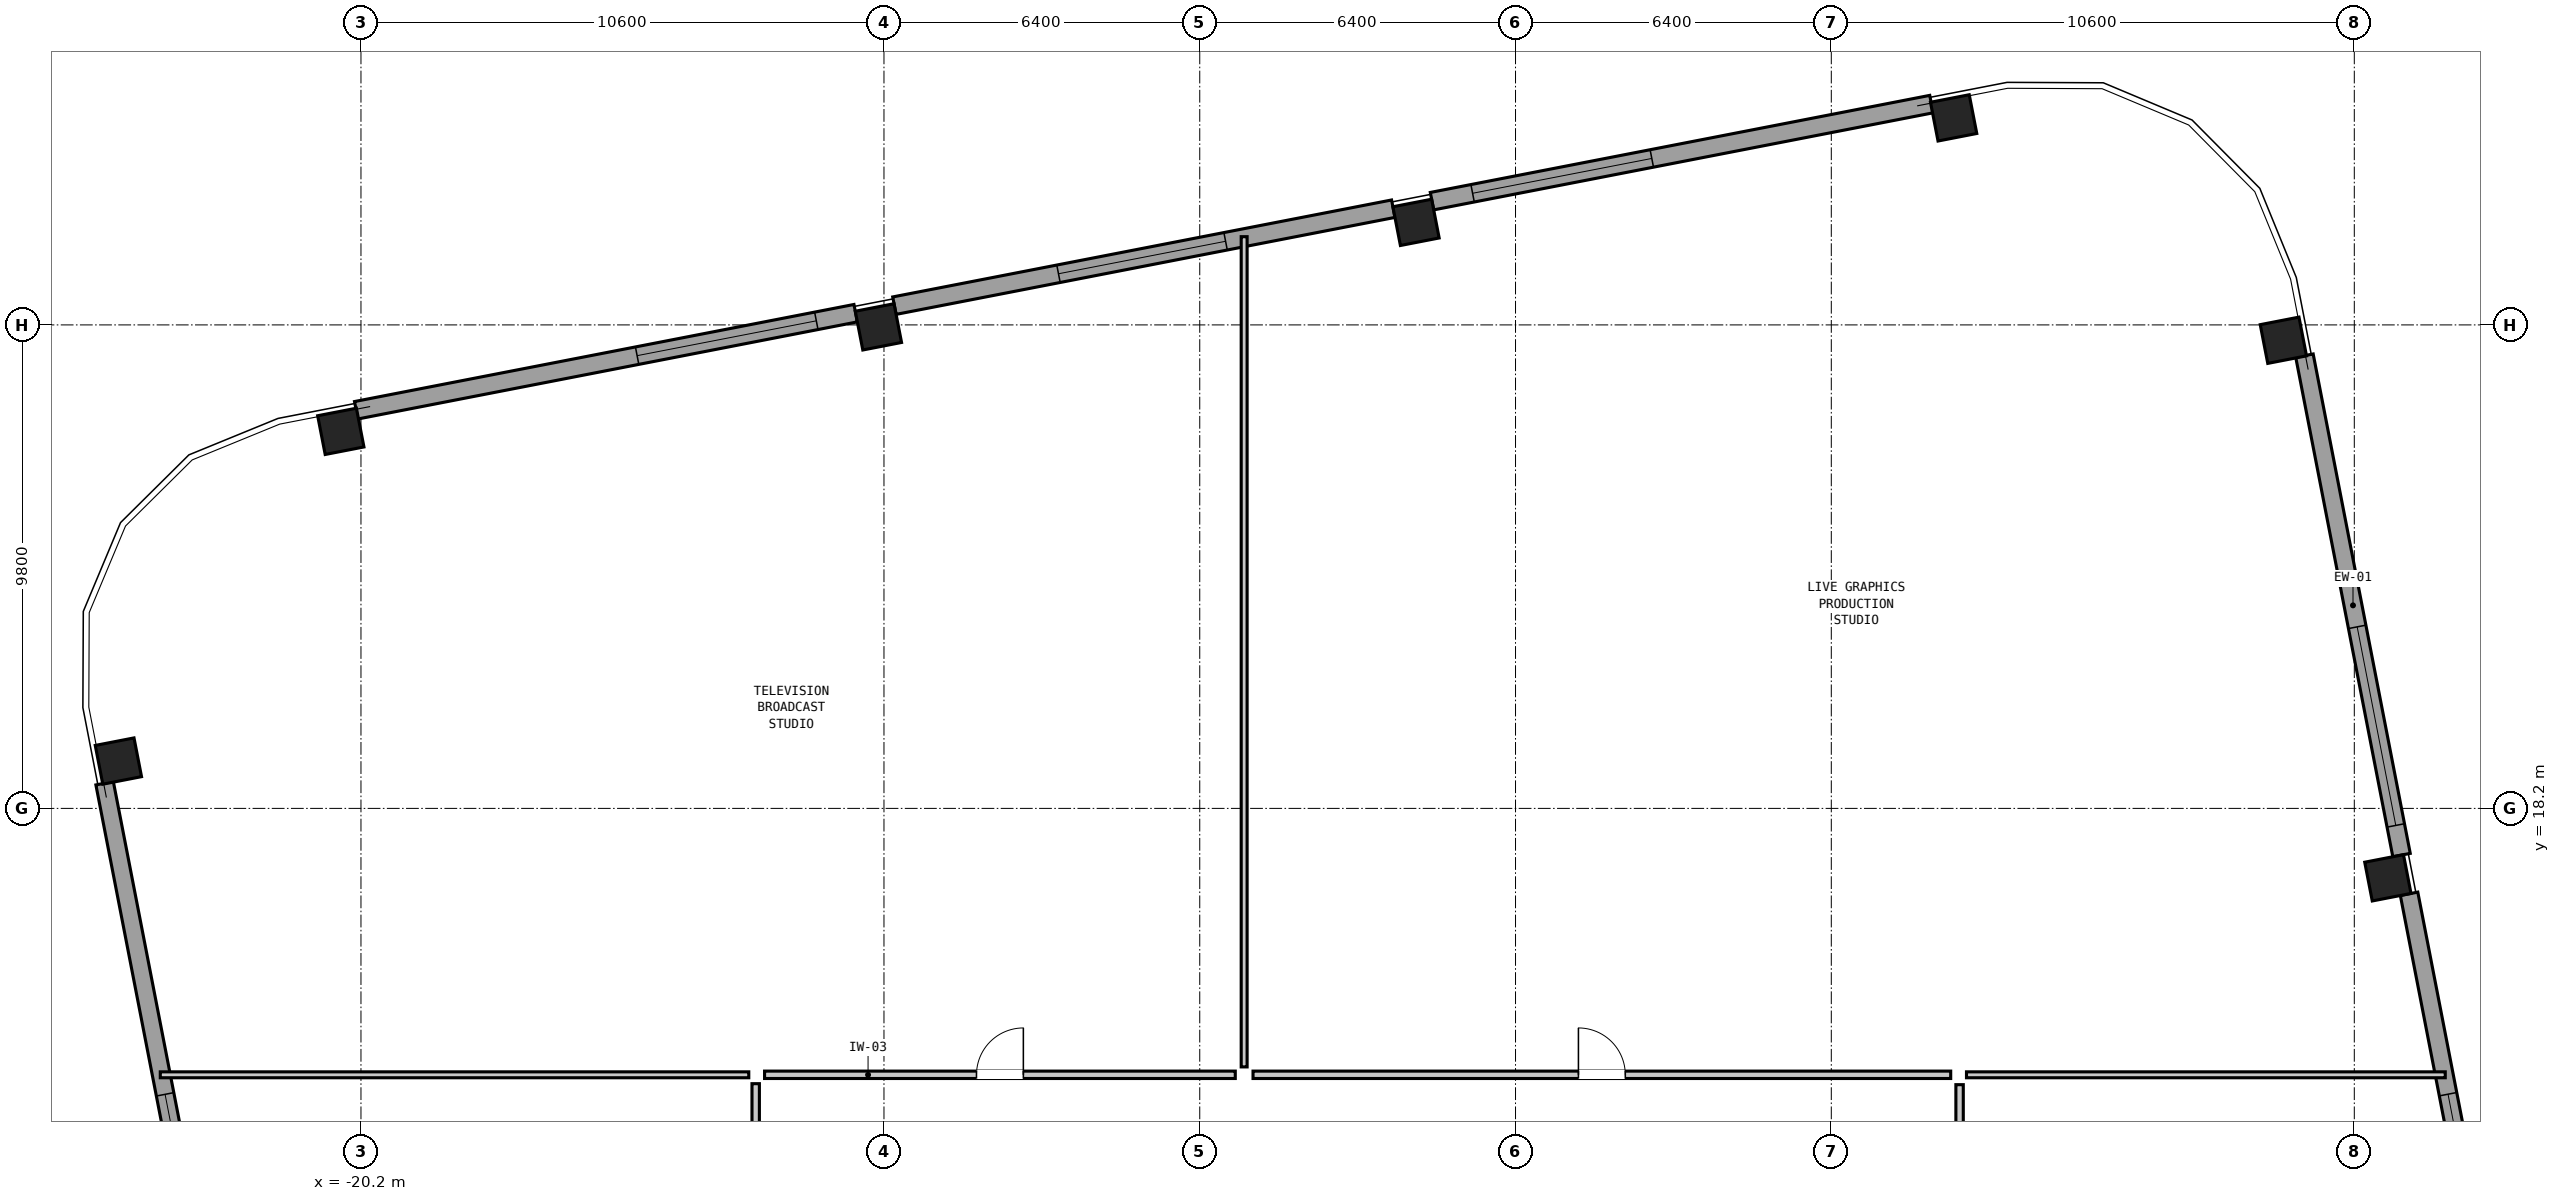
"""IFC4 building model, lengths in metres.
Left out: names, types, materials, properties, quantities, classifications, styles, units other than length and angle.
Written with IfcOpenShell. Run it as: python <this file> out.ifc"""

import sys

from ifc_helpers import new_model, si_unit, direction, frame, frame_2d, origin, origin_2d, place, context, subcontext, project, spatial, rectangle, hollow_rectangle, extrude, element, fill, save


model = new_model("IFC4")
c1 = context("Model", 3, precision=1e-05, world=origin(), true_north=direction((0.0, 1.0)))
c2 = subcontext(c1, "Body", "Model", "MODEL_VIEW")
j1 = project(units=[si_unit("LENGTHUNIT", "METRE"), si_unit("PLANEANGLEUNIT", "RADIAN")], contexts=[c1])
p1 = place(None, origin())
s1 = spatial("IfcSite", under=j1, at=p1, CompositionType="ELEMENT")
p2 = place(p1, origin())
s2 = spatial("IfcBuilding", under=s1, at=p2, CompositionType="ELEMENT")
p3 = place(p2, frame((0.0, 0.0, 112.8)))
s3 = spatial("IfcBuildingStorey", under=s2, at=p3, CompositionType="ELEMENT", Elevation=112.8)
for number, where, z_axis, x_axis in (
    (1, (20.88, 16.792, 0.0), (0.0, 0.0, 1.0), (-0.191, 0.982, 0.0)),
    (2, (18.762, 27.689, 0.0), (0.0, 0.0, 1.0), (-0.191, 0.982, 0.0)),
    (3, (12.08, 32.196, 0.0), (0.0, 0.0, 1.0), (0.982, 0.191, 0.0)),
    (4, (1.183, 30.078, 0.0), (0.0, 0.0, 1.0), (0.982, 0.191, 0.0)),
    (5, (-9.713, 27.96, 0.0), (0.0, 0.0, 1.0), (0.982, 0.191, 0.0)),
    (6, (-20.609, 25.842, 0.0), (0.0, 0.0, 1.0), (0.982, 0.191, 0.0)),
    (7, (-25.116, 19.159, 0.0), (0.0, 0.0, 1.0), (-0.191, 0.982, 0.0)),
):
    element("IfcColumn", number, at=place(p3, frame(where, z_axis=z_axis, x_axis=x_axis)), inside=s3, PredefinedType="COLUMN", context=c2, shape_type="SweptSolid", body=[
        extrude(hollow_rectangle(XDim=0.8, YDim=0.8, WallThickness=0.05, at=origin_2d()), origin(), (0.0, 0.0, 1.0), 3.05),
    ])
p4 = place(p3, frame((19.19, 27.376, 0.0), z_axis=(0.0, 0.0, 1.0), x_axis=(0.190822765986, -0.981624506612, 0.0)))
e8 = element("IfcWall", 8, at=p4, inside=s3, PredefinedType="SOLIDWALL", context=c2, shape_type="SweptSolid", body=[
    extrude(rectangle(XDim=10.312, YDim=0.36, at=frame_2d((5.156, 0.0))), origin(), (0.0, 0.0, 1.0), 1.632),
])
p5 = place(p4, frame((5.6, 0.0, 0.2)))
e9 = element("IfcOpeningElement", 9, at=p5, cuts=e8, PredefinedType="OPENING", context=c2, shape_type="SweptSolid", body=[
    extrude(rectangle(XDim=4.1, YDim=1.05, at=frame_2d((2.05, 0.525))), frame((0.0, 0.192, 0.0), z_axis=(0.0, -1.0, 0.0), x_axis=(1.0, 0.0, 0.0)), (0.0, 0.0, 1.0), 0.384),
])
p6 = place(p3, frame((21.31, 16.469, 0.0), z_axis=(0.0, 0.0, 1.0), x_axis=(0.190811924826, -0.981626614016, 0.0)))
e10 = element("IfcWall", 10, at=p6, inside=s3, PredefinedType="SOLIDWALL", context=c2, shape_type="SweptSolid", body=[
    extrude(rectangle(XDim=10.3, YDim=0.36, at=frame_2d((5.15, 0.0))), origin(), (0.0, 0.0, 1.0), 1.632),
])
p7 = place(p6, frame((4.138, 0.0, 0.2)))
e11 = element("IfcOpeningElement", 11, at=p7, cuts=e10, PredefinedType="OPENING", context=c2, shape_type="SweptSolid", body=[
    extrude(rectangle(XDim=2.7, YDim=1.25, at=frame_2d((1.35, 0.625))), frame((0.0, 0.192, 0.0), z_axis=(0.0, -1.0, 0.0), x_axis=(1.0, 0.0, 0.0)), (0.0, 0.0, 1.0), 0.384),
])
p8 = place(p3, frame((-20.296, 26.27, 0.0), z_axis=(0.0, 0.0, 1.0), x_axis=(0.981628941133, 0.190799952646, 0.0)))
e12 = element("IfcWall", 12, at=p8, inside=s3, PredefinedType="SOLIDWALL", context=c2, shape_type="SweptSolid", body=[
    extrude(rectangle(XDim=10.312, YDim=0.36, at=frame_2d((5.156, 0.0))), origin(), (0.0, 0.0, 1.0), 1.632),
])
p9 = place(p8, frame((5.8, 0.0, 0.2)))
e13 = element("IfcOpeningElement", 13, at=p9, cuts=e12, PredefinedType="OPENING", context=c2, shape_type="SweptSolid", body=[
    extrude(rectangle(XDim=3.7, YDim=1.1, at=frame_2d((1.85, 0.55))), frame((0.0, 0.192, 0.0), z_axis=(0.0, -1.0, 0.0), x_axis=(1.0, 0.0, 0.0)), (0.0, 0.0, 1.0), 0.384),
])
p10 = place(p3, frame((-9.389, 28.39, 0.0), z_axis=(0.0, 0.0, 1.0), x_axis=(0.981627477005, 0.190807485147, 0.0)))
e14 = element("IfcWall", 14, at=p10, inside=s3, PredefinedType="SOLIDWALL", context=c2, shape_type="SweptSolid", body=[
    extrude(rectangle(XDim=10.3, YDim=0.36, at=frame_2d((5.15, 0.0))), origin(), (0.0, 0.0, 1.0), 1.632),
])
p11 = place(p10, frame((3.388, 0.0, 0.2)))
e15 = element("IfcOpeningElement", 15, at=p11, cuts=e14, PredefinedType="OPENING", context=c2, shape_type="SweptSolid", body=[
    extrude(rectangle(XDim=3.45, YDim=1.15, at=frame_2d((1.725, 0.575))), frame((0.0, 0.192, 0.0), z_axis=(0.0, -1.0, 0.0), x_axis=(1.0, 0.0, 0.0)), (0.0, 0.0, 1.0), 0.384),
])
p12 = place(p3, frame((1.507, 30.508, 0.0), z_axis=(0.0, 0.0, 1.0), x_axis=(0.981628941133, 0.190799952646, 0.0)))
e16 = element("IfcWall", 16, at=p12, inside=s3, PredefinedType="SOLIDWALL", context=c2, shape_type="SweptSolid", body=[
    extrude(rectangle(XDim=10.312, YDim=0.36, at=frame_2d((5.156, 0.0))), origin(), (0.0, 0.0, 1.0), 1.632),
])
p13 = place(p12, frame((0.838, 0.0, 0.2)))
e17 = element("IfcOpeningElement", 17, at=p13, cuts=e16, PredefinedType="OPENING", context=c2, shape_type="SweptSolid", body=[
    extrude(rectangle(XDim=3.7, YDim=1.1, at=frame_2d((1.85, 0.55))), frame((0.0, 0.192, 0.0), z_axis=(0.0, -1.0, 0.0), x_axis=(1.0, 0.0, 0.0)), (0.0, 0.0, 1.0), 0.384),
])
p14 = place(p3, frame((-23.428, 8.587, 0.0), z_axis=(0.0, 0.0, 1.0), x_axis=(-0.190822765986, 0.981624506612, 0.0)))
e18 = element("IfcWall", 18, at=p14, inside=s3, PredefinedType="SOLIDWALL", context=c2, shape_type="SweptSolid", body=[
    extrude(rectangle(XDim=10.312, YDim=0.36, at=frame_2d((5.156, 0.0))), origin(), (0.0, 0.0, 1.0), 1.632),
])
p15 = place(p14, frame((0.988, 0.0, 0.2)))
e19 = element("IfcOpeningElement", 19, at=p15, cuts=e18, PredefinedType="OPENING", context=c2, shape_type="SweptSolid", body=[
    extrude(rectangle(XDim=2.9, YDim=1.25, at=frame_2d((1.45, 0.625))), frame((0.0, 0.192, 0.0), z_axis=(0.0, -1.0, 0.0), x_axis=(1.0, 0.0, 0.0)), (0.0, 0.0, 1.0), 0.384),
])
p16 = place(p3, frame((-24.267, 12.8, 0.0), z_axis=(0.0, 0.0, 1.0), x_axis=(1.0, 0.0, 0.0)))
e20 = element("IfcWall", 20, at=p16, inside=s3, PredefinedType="PARTITIONING", context=c2, shape_type="SweptSolid", body=[
    extrude(rectangle(XDim=11.927, YDim=0.12, at=frame_2d((5.964, 0.0))), origin(), (0.0, 0.0, 1.0), 2.83),
])
p17 = place(p3, frame((12.34, 12.8, 0.0), z_axis=(0.0, 0.0, 1.0), x_axis=(1.0, 0.0, 0.0)))
e21 = element("IfcWall", 21, at=p17, inside=s3, PredefinedType="PARTITIONING", context=c2, shape_type="SweptSolid", body=[
    extrude(rectangle(XDim=9.703, YDim=0.12, at=frame_2d((4.852, 0.0))), origin(), (0.0, 0.0, 1.0), 2.83),
])
p18 = place(p3, frame((-2.3, 12.96, 0.0), z_axis=(0.0, 0.0, 1.0), x_axis=(0.0, 1.0, 0.0)))
e22 = element("IfcWall", 22, at=p18, inside=s3, PredefinedType="PARTITIONING", context=c2, shape_type="SweptSolid", body=[
    extrude(rectangle(XDim=16.828, YDim=0.12, at=frame_2d((8.414, 0.0))), origin(), (0.0, 0.0, 1.0), 2.83),
])
p19 = place(p3, frame((-12.02, 12.8, 0.0), z_axis=(0.0, 0.0, 1.0), x_axis=(1.0, 0.0, 0.0)))
e23 = element("IfcWall", 23, at=p19, inside=s3, PredefinedType="PARTITIONING", context=c2, shape_type="SweptSolid", body=[
    extrude(rectangle(XDim=9.54, YDim=0.15, at=frame_2d((4.77, 0.0))), origin(), (0.0, 0.0, 1.0), 2.83),
])
p20 = place(p19, frame((4.295, 0.0, 0.0)))
e24 = element("IfcOpeningElement", 24, at=p20, cuts=e23, PredefinedType="OPENING", context=c2, shape_type="SweptSolid", body=[
    extrude(rectangle(XDim=0.95, YDim=2.1, at=frame_2d((0.475, 1.05))), frame((0.0, 0.087, 0.0), z_axis=(0.0, -1.0, 0.0), x_axis=(1.0, 0.0, 0.0)), (0.0, 0.0, 1.0), 0.174),
])
p21 = place(p3, frame((-2.12, 12.8, 0.0), z_axis=(0.0, 0.0, 1.0), x_axis=(1.0, 0.0, 0.0)))
e25 = element("IfcWall", 25, at=p21, inside=s3, PredefinedType="PARTITIONING", context=c2, shape_type="SweptSolid", body=[
    extrude(rectangle(XDim=14.14, YDim=0.15, at=frame_2d((7.07, 0.0))), origin(), (0.0, 0.0, 1.0), 2.83),
])
p22 = place(p21, frame((6.595, 0.0, 0.0)))
e26 = element("IfcOpeningElement", 26, at=p22, cuts=e25, PredefinedType="OPENING", context=c2, shape_type="SweptSolid", body=[
    extrude(rectangle(XDim=0.95, YDim=2.1, at=frame_2d((0.475, 1.05))), frame((0.0, 0.087, 0.0), z_axis=(0.0, -1.0, 0.0), x_axis=(1.0, 0.0, 0.0)), (0.0, 0.0, 1.0), 0.174),
])
p23 = place(p3, frame((-12.2, -11.42, 0.0), z_axis=(0.0, 0.0, 1.0), x_axis=(0.0, 1.0, 0.0)))
e27 = element("IfcWall", 27, at=p23, inside=s3, PredefinedType="PARTITIONING", context=c2, shape_type="SweptSolid", body=[
    extrude(rectangle(XDim=24.04, YDim=0.15, at=frame_2d((12.02, 0.0))), origin(), (0.0, 0.0, 1.0), 2.83),
])
p24 = place(p23, frame((11.545, 0.0, 0.0)))
e28 = element("IfcOpeningElement", 28, at=p24, cuts=e27, PredefinedType="OPENING", context=c2, shape_type="SweptSolid", body=[
    extrude(rectangle(XDim=0.95, YDim=2.1, at=frame_2d((0.475, 1.05))), frame((0.0, 0.087, 0.0), z_axis=(0.0, -1.0, 0.0), x_axis=(1.0, 0.0, 0.0)), (0.0, 0.0, 1.0), 0.174),
])
p25 = place(p3, frame((12.2, 3.8, 0.0), z_axis=(0.0, 0.0, 1.0), x_axis=(0.0, 1.0, 0.0)))
e29 = element("IfcWall", 29, at=p25, inside=s3, PredefinedType="PARTITIONING", context=c2, shape_type="SweptSolid", body=[
    extrude(rectangle(XDim=8.8, YDim=0.15, at=frame_2d((4.4, 0.0))), origin(), (0.0, 0.0, 1.0), 2.83),
])
p26 = place(p25, frame((3.925, 0.0, 0.0)))
e30 = element("IfcOpeningElement", 30, at=p26, cuts=e29, PredefinedType="OPENING", context=c2, shape_type="SweptSolid", body=[
    extrude(rectangle(XDim=0.95, YDim=2.1, at=frame_2d((0.475, 1.05))), frame((0.0, 0.087, 0.0), z_axis=(0.0, -1.0, 0.0), x_axis=(1.0, 0.0, 0.0)), (0.0, 0.0, 1.0), 0.174),
])
p27 = place(p5, origin())
e31 = element("IfcWindow", 31, at=p27, inside=s3, PartitioningType="SINGLE_PANEL", PredefinedType="WINDOW", context=c2, shape_type="SweptSolid", body=[
    extrude(rectangle(XDim=4.1, YDim=1.05, at=frame_2d((2.05, 0.525))), frame((0.0, 0.03, 0.0), z_axis=(0.0, -1.0, 0.0), x_axis=(1.0, 0.0, 0.0)), (0.0, 0.0, 1.0), 0.06),
])
fill(e9, e31)
p28 = place(p7, origin())
e32 = element("IfcWindow", 32, at=p28, inside=s3, PartitioningType="SINGLE_PANEL", PredefinedType="WINDOW", context=c2, shape_type="SweptSolid", body=[
    extrude(rectangle(XDim=2.7, YDim=1.25, at=frame_2d((1.35, 0.625))), frame((0.0, 0.03, 0.0), z_axis=(0.0, -1.0, 0.0), x_axis=(1.0, 0.0, 0.0)), (0.0, 0.0, 1.0), 0.06),
])
fill(e11, e32)
p29 = place(p9, origin())
e33 = element("IfcWindow", 33, at=p29, inside=s3, PartitioningType="SINGLE_PANEL", PredefinedType="WINDOW", context=c2, shape_type="SweptSolid", body=[
    extrude(rectangle(XDim=3.7, YDim=1.1, at=frame_2d((1.85, 0.55))), frame((0.0, 0.03, 0.0), z_axis=(0.0, -1.0, 0.0), x_axis=(1.0, 0.0, 0.0)), (0.0, 0.0, 1.0), 0.06),
])
fill(e13, e33)
p30 = place(p11, origin())
e34 = element("IfcWindow", 34, at=p30, inside=s3, PartitioningType="SINGLE_PANEL", PredefinedType="WINDOW", context=c2, shape_type="SweptSolid", body=[
    extrude(rectangle(XDim=3.45, YDim=1.15, at=frame_2d((1.725, 0.575))), frame((0.0, 0.03, 0.0), z_axis=(0.0, -1.0, 0.0), x_axis=(1.0, 0.0, 0.0)), (0.0, 0.0, 1.0), 0.06),
])
fill(e15, e34)
p31 = place(p13, origin())
e35 = element("IfcWindow", 35, at=p31, inside=s3, PartitioningType="SINGLE_PANEL", PredefinedType="WINDOW", context=c2, shape_type="SweptSolid", body=[
    extrude(rectangle(XDim=3.7, YDim=1.1, at=frame_2d((1.85, 0.55))), frame((0.0, 0.03, 0.0), z_axis=(0.0, -1.0, 0.0), x_axis=(1.0, 0.0, 0.0)), (0.0, 0.0, 1.0), 0.06),
])
fill(e17, e35)
p32 = place(p15, origin())
e36 = element("IfcWindow", 36, at=p32, inside=s3, PartitioningType="SINGLE_PANEL", PredefinedType="WINDOW", context=c2, shape_type="SweptSolid", body=[
    extrude(rectangle(XDim=2.9, YDim=1.25, at=frame_2d((1.45, 0.625))), frame((0.0, 0.03, 0.0), z_axis=(0.0, -1.0, 0.0), x_axis=(1.0, 0.0, 0.0)), (0.0, 0.0, 1.0), 0.06),
])
fill(e19, e36)
p33 = place(p20, origin())
e37 = element("IfcDoor", 37, at=p33, inside=s3, OperationType="SINGLE_SWING_RIGHT", PredefinedType="DOOR", context=c2, shape_type="SweptSolid", body=[
    extrude(rectangle(XDim=0.95, YDim=2.1, at=frame_2d((0.475, 1.05))), frame((0.0, 0.025, 0.0), z_axis=(0.0, -1.0, 0.0), x_axis=(1.0, 0.0, 0.0)), (0.0, 0.0, 1.0), 0.05),
])
fill(e24, e37)
p34 = place(p22, origin())
e38 = element("IfcDoor", 38, at=p34, inside=s3, OperationType="SINGLE_SWING_LEFT", PredefinedType="DOOR", context=c2, shape_type="SweptSolid", body=[
    extrude(rectangle(XDim=0.95, YDim=2.1, at=frame_2d((0.475, 1.05))), frame((0.0, 0.025, 0.0), z_axis=(0.0, -1.0, 0.0), x_axis=(1.0, 0.0, 0.0)), (0.0, 0.0, 1.0), 0.05),
])
fill(e26, e38)
save(model, sys.argv[1])
